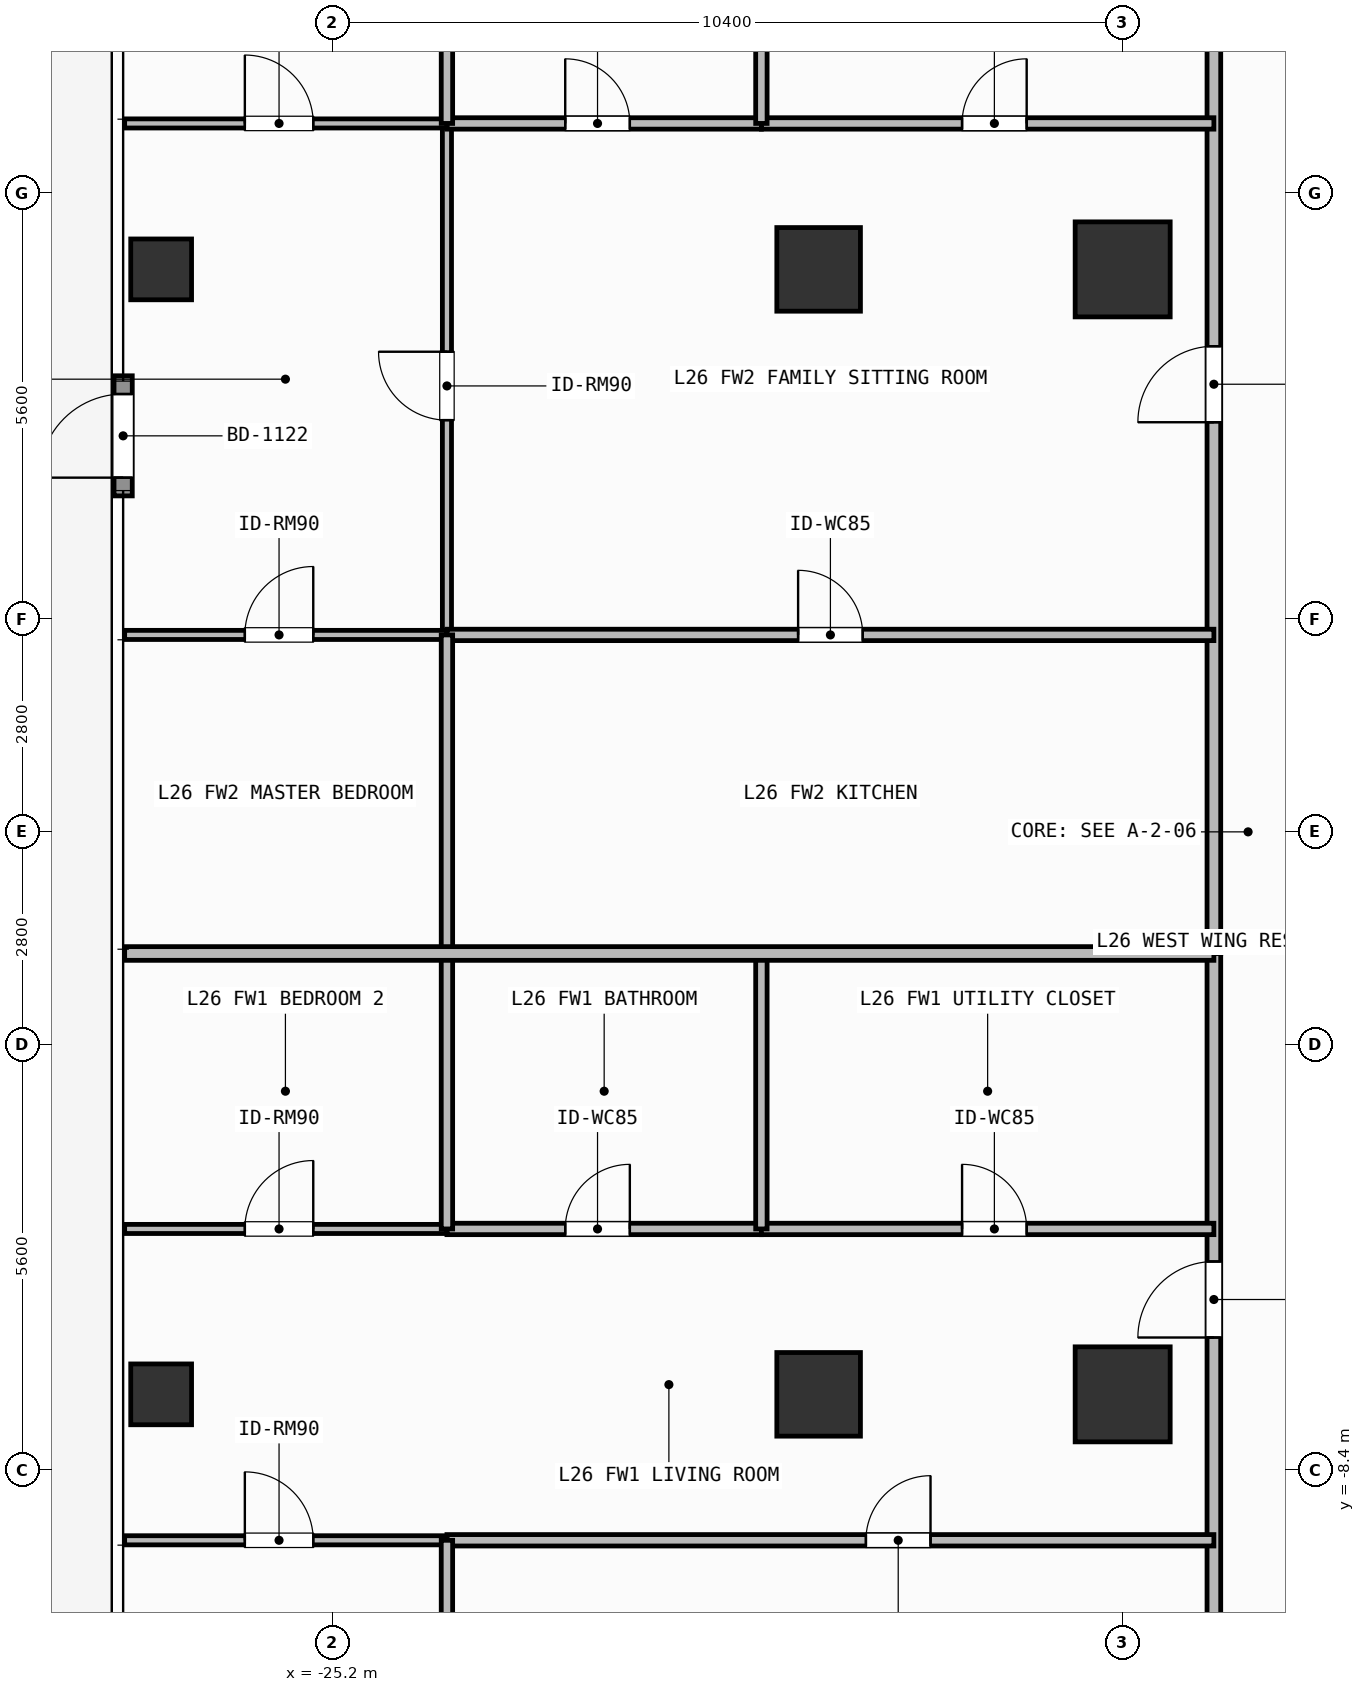
"""IFC4 building model, lengths in metres.
Left out: names, types, materials, properties, quantities, classifications, styles, units other than length and angle.
Written with IfcOpenShell. Run it as: python <this file> out.ifc"""

import sys

from ifc_helpers import new_model, si_unit, direction, frame, frame_2d, origin, origin_2d, place, context, subcontext, project, spatial, rectangle, hollow_rectangle, extrude, element, fill, save


model = new_model("IFC4")
c1 = context("Model", 3, precision=1e-05, world=origin(), true_north=direction((0.0, 1.0)))
c2 = subcontext(c1, "Body", "Model", "MODEL_VIEW")
j1 = project(units=[si_unit("LENGTHUNIT", "METRE"), si_unit("PLANEANGLEUNIT", "RADIAN")], contexts=[c1])
p1 = place(None, origin())
s1 = spatial("IfcSite", under=j1, at=p1, CompositionType="ELEMENT")
p2 = place(p1, origin())
s2 = spatial("IfcBuilding", under=s1, at=p2, CompositionType="ELEMENT")
p3 = place(p2, frame((0.0, 0.0, 104.7)))
s3 = spatial("IfcBuildingStorey", under=s2, at=p3, CompositionType="ELEMENT", Elevation=104.7)
for number, where, z_axis, x_axis in (
    (1, (-14.8, -7.4, 0.0), (0.0, 0.0, 1.0), (1.0, 0.0, 0.0)),
    (2, (-14.8, 7.4, 0.0), (0.0, 0.0, 1.0), (1.0, 0.0, 0.0)),
):
    element("IfcColumn", number, at=place(p3, frame(where, z_axis=z_axis, x_axis=x_axis)), inside=s3, PredefinedType="COLUMN", context=c2, shape_type="SweptSolid", body=[
        extrude(rectangle(XDim=1.25, YDim=1.25, at=origin_2d()), origin(), (0.0, 0.0, 1.0), 3.9),
    ])
for number, where, z_axis, x_axis in (
    (3, (-18.8, -7.4, 0.0), (0.0, 0.0, 1.0), (1.0, 0.0, 0.0)),
    (4, (-18.8, 7.4, 0.0), (0.0, 0.0, 1.0), (1.0, 0.0, 0.0)),
):
    element("IfcColumn", number, at=place(p3, frame(where, z_axis=z_axis, x_axis=x_axis)), inside=s3, PredefinedType="COLUMN", context=c2, shape_type="SweptSolid", body=[
        extrude(rectangle(XDim=1.1, YDim=1.1, at=origin_2d()), origin(), (0.0, 0.0, 1.0), 3.9),
    ])
for number, where, z_axis, x_axis in (
    (5, (-27.45, -7.4, 0.0), (0.0, 0.0, 1.0), (1.0, 0.0, 0.0)),
    (6, (-27.45, 7.4, 0.0), (0.0, 0.0, 1.0), (1.0, 0.0, 0.0)),
):
    element("IfcColumn", number, at=place(p3, frame(where, z_axis=z_axis, x_axis=x_axis)), inside=s3, PredefinedType="COLUMN", context=c2, shape_type="SweptSolid", body=[
        extrude(hollow_rectangle(XDim=0.8, YDim=0.8, WallThickness=0.036, at=origin_2d()), origin(), (0.0, 0.0, 1.0), 3.9),
    ])
p4 = place(p3, frame((-27.95, 4.42, 0.0), z_axis=(0.0, 0.0, 1.0), x_axis=(0.0, 1.0, 0.0)))
e7 = element("IfcWall", 7, at=p4, inside=s3, PredefinedType="SOLIDWALL", context=c2, shape_type="SweptSolid", body=[
    extrude(rectangle(XDim=1.58, YDim=0.24, at=frame_2d((0.79, 0.0))), origin(), (0.0, 0.0, 1.0), 3.62),
])
p5 = place(p4, frame((0.24, 0.0, 0.0)))
e8 = element("IfcOpeningElement", 8, at=p5, cuts=e7, PredefinedType="OPENING", context=c2, shape_type="SweptSolid", body=[
    extrude(rectangle(XDim=1.1, YDim=2.2, at=frame_2d((0.55, 1.1))), frame((0.0, 0.13, 0.0), z_axis=(0.0, -1.0, 0.0), x_axis=(1.0, 0.0, 0.0)), (0.0, 0.0, 1.0), 0.26),
])
p6 = place(p3, frame((-13.6, -12.12, 0.0), z_axis=(0.0, 0.0, 1.0), x_axis=(0.0, 1.0, 0.0)))
e9 = element("IfcWall", 9, at=p6, inside=s3, PredefinedType="PARTITIONING", context=c2, shape_type="SweptSolid", body=[
    extrude(rectangle(XDim=10.52, YDim=0.18, at=frame_2d((5.26, 0.0))), origin(), (0.0, 0.0, 1.0), 3.62),
])
p7 = place(p6, frame((5.468, 0.0, 0.0)))
e10 = element("IfcOpeningElement", 10, at=p7, cuts=e9, PredefinedType="OPENING", context=c2, shape_type="SweptSolid", body=[
    extrude(rectangle(XDim=1.0, YDim=2.2, at=frame_2d((0.5, 1.1))), frame((0.0, 0.1, 0.0), z_axis=(0.0, -1.0, 0.0), x_axis=(1.0, 0.0, 0.0)), (0.0, 0.0, 1.0), 0.2),
])
p8 = place(p3, frame((-23.69, -5.224, 0.0), z_axis=(0.0, 0.0, 1.0), x_axis=(1.0, 0.0, 0.0)))
e11 = element("IfcWall", 11, at=p8, inside=s3, PredefinedType="PARTITIONING", context=c2, shape_type="SweptSolid", body=[
    extrude(rectangle(XDim=4.137, YDim=0.15, at=frame_2d((2.068, 0.0))), origin(), (0.0, 0.0, 1.0), 3.62),
])
p9 = place(p8, frame((1.556, 0.0, 0.0)))
e12 = element("IfcOpeningElement", 12, at=p9, cuts=e11, PredefinedType="OPENING", context=c2, shape_type="SweptSolid", body=[
    extrude(rectangle(XDim=0.85, YDim=2.1, at=frame_2d((0.425, 1.05))), frame((0.0, 0.085, 0.0), z_axis=(0.0, -1.0, 0.0), x_axis=(1.0, 0.0, 0.0)), (0.0, 0.0, 1.0), 0.17),
])
p10 = place(p3, frame((-19.553, -5.224, 0.0), z_axis=(0.0, 0.0, 1.0), x_axis=(1.0, 0.0, 0.0)))
e13 = element("IfcWall", 13, at=p10, inside=s3, PredefinedType="PARTITIONING", context=c2, shape_type="SweptSolid", body=[
    extrude(rectangle(XDim=5.953, YDim=0.15, at=frame_2d((2.977, 0.0))), origin(), (0.0, 0.0, 1.0), 3.62),
])
p11 = place(p10, frame((2.64, 0.0, 0.0)))
e14 = element("IfcOpeningElement", 14, at=p11, cuts=e13, PredefinedType="OPENING", context=c2, shape_type="SweptSolid", body=[
    extrude(rectangle(XDim=0.85, YDim=2.1, at=frame_2d((0.425, 1.05))), frame((0.0, 0.085, 0.0), z_axis=(0.0, -1.0, 0.0), x_axis=(1.0, 0.0, 0.0)), (0.0, 0.0, 1.0), 0.17),
])
p12 = place(p3, frame((-23.69, -9.32, 0.0), z_axis=(0.0, 0.0, 1.0), x_axis=(1.0, 0.0, 0.0)))
e15 = element("IfcWall", 15, at=p12, inside=s3, PredefinedType="PARTITIONING", context=c2, shape_type="SweptSolid", body=[
    extrude(rectangle(XDim=10.09, YDim=0.15, at=frame_2d((5.045, 0.0))), origin(), (0.0, 0.0, 1.0), 3.62),
])
p13 = place(p12, frame((5.512, 0.0, 0.0)))
e16 = element("IfcOpeningElement", 16, at=p13, cuts=e15, PredefinedType="OPENING", context=c2, shape_type="SweptSolid", body=[
    extrude(rectangle(XDim=0.85, YDim=2.1, at=frame_2d((0.425, 1.05))), frame((0.0, 0.085, 0.0), z_axis=(0.0, -1.0, 0.0), x_axis=(1.0, 0.0, 0.0)), (0.0, 0.0, 1.0), 0.17),
])
p14 = place(p3, frame((-27.93, -9.32, 0.0), z_axis=(0.0, 0.0, 1.0), x_axis=(1.0, 0.0, 0.0)))
e17 = element("IfcWall", 17, at=p14, inside=s3, PredefinedType="PARTITIONING", context=c2, shape_type="SweptSolid", body=[
    extrude(rectangle(XDim=4.24, YDim=0.12, at=frame_2d((2.12, 0.0))), origin(), (0.0, 0.0, 1.0), 3.62),
])
p15 = place(p14, frame((1.581, 0.0, 0.0)))
e18 = element("IfcOpeningElement", 18, at=p15, cuts=e17, PredefinedType="OPENING", context=c2, shape_type="SweptSolid", body=[
    extrude(rectangle(XDim=0.9, YDim=2.1, at=frame_2d((0.45, 1.05))), frame((0.0, 0.07, 0.0), z_axis=(0.0, -1.0, 0.0), x_axis=(1.0, 0.0, 0.0)), (0.0, 0.0, 1.0), 0.14),
])
p16 = place(p3, frame((-27.93, -5.224, 0.0), z_axis=(0.0, 0.0, 1.0), x_axis=(1.0, 0.0, 0.0)))
e19 = element("IfcWall", 19, at=p16, inside=s3, PredefinedType="PARTITIONING", context=c2, shape_type="SweptSolid", body=[
    extrude(rectangle(XDim=4.24, YDim=0.12, at=frame_2d((2.12, 0.0))), origin(), (0.0, 0.0, 1.0), 3.62),
])
p17 = place(p16, frame((1.581, 0.0, 0.0)))
e20 = element("IfcOpeningElement", 20, at=p17, cuts=e19, PredefinedType="OPENING", context=c2, shape_type="SweptSolid", body=[
    extrude(rectangle(XDim=0.9, YDim=2.1, at=frame_2d((0.45, 1.05))), frame((0.0, 0.07, 0.0), z_axis=(0.0, -1.0, 0.0), x_axis=(1.0, 0.0, 0.0)), (0.0, 0.0, 1.0), 0.14),
])
p18 = place(p3, frame((-13.6, -1.6, 0.0), z_axis=(0.0, 0.0, 1.0), x_axis=(0.0, 1.0, 0.0)))
e21 = element("IfcWall", 21, at=p18, inside=s3, PredefinedType="PARTITIONING", context=c2, shape_type="SweptSolid", body=[
    extrude(rectangle(XDim=13.72, YDim=0.18, at=frame_2d((6.86, 0.0))), origin(), (0.0, 0.0, 1.0), 3.62),
])
p19 = place(p18, frame((6.989, 0.0, 0.0)))
e22 = element("IfcOpeningElement", 22, at=p19, cuts=e21, PredefinedType="OPENING", context=c2, shape_type="SweptSolid", body=[
    extrude(rectangle(XDim=1.0, YDim=2.2, at=frame_2d((0.5, 1.1))), frame((0.0, 0.1, 0.0), z_axis=(0.0, -1.0, 0.0), x_axis=(1.0, 0.0, 0.0)), (0.0, 0.0, 1.0), 0.2),
])
p20 = place(p3, frame((-23.69, 2.591, 0.0), z_axis=(0.0, 0.0, 1.0), x_axis=(0.0, 1.0, 0.0)))
e23 = element("IfcWall", 23, at=p20, inside=s3, PredefinedType="PARTITIONING", context=c2, shape_type="SweptSolid", body=[
    extrude(rectangle(XDim=6.729, YDim=0.12, at=frame_2d((3.365, 0.0))), origin(), (0.0, 0.0, 1.0), 3.62),
])
p21 = place(p20, frame((2.826, 0.0, 0.0)))
e24 = element("IfcOpeningElement", 24, at=p21, cuts=e23, PredefinedType="OPENING", context=c2, shape_type="SweptSolid", body=[
    extrude(rectangle(XDim=0.9, YDim=2.1, at=frame_2d((0.45, 1.05))), frame((0.0, 0.07, 0.0), z_axis=(0.0, -1.0, 0.0), x_axis=(1.0, 0.0, 0.0)), (0.0, 0.0, 1.0), 0.14),
])
p22 = place(p3, frame((-23.69, 9.32, 0.0), z_axis=(0.0, 0.0, 1.0), x_axis=(1.0, 0.0, 0.0)))
e25 = element("IfcWall", 25, at=p22, inside=s3, PredefinedType="PARTITIONING", context=c2, shape_type="SweptSolid", body=[
    extrude(rectangle(XDim=4.137, YDim=0.15, at=frame_2d((2.068, 0.0))), origin(), (0.0, 0.0, 1.0), 3.62),
])
p23 = place(p22, frame((1.556, 0.0, 0.0)))
e26 = element("IfcOpeningElement", 26, at=p23, cuts=e25, PredefinedType="OPENING", context=c2, shape_type="SweptSolid", body=[
    extrude(rectangle(XDim=0.85, YDim=2.1, at=frame_2d((0.425, 1.05))), frame((0.0, 0.085, 0.0), z_axis=(0.0, -1.0, 0.0), x_axis=(1.0, 0.0, 0.0)), (0.0, 0.0, 1.0), 0.17),
])
p24 = place(p3, frame((-19.553, 9.32, 0.0), z_axis=(0.0, 0.0, 1.0), x_axis=(1.0, 0.0, 0.0)))
e27 = element("IfcWall", 27, at=p24, inside=s3, PredefinedType="PARTITIONING", context=c2, shape_type="SweptSolid", body=[
    extrude(rectangle(XDim=5.953, YDim=0.15, at=frame_2d((2.977, 0.0))), origin(), (0.0, 0.0, 1.0), 3.62),
])
p25 = place(p24, frame((2.64, 0.0, 0.0)))
e28 = element("IfcOpeningElement", 28, at=p25, cuts=e27, PredefinedType="OPENING", context=c2, shape_type="SweptSolid", body=[
    extrude(rectangle(XDim=0.85, YDim=2.1, at=frame_2d((0.425, 1.05))), frame((0.0, 0.085, 0.0), z_axis=(0.0, -1.0, 0.0), x_axis=(1.0, 0.0, 0.0)), (0.0, 0.0, 1.0), 0.17),
])
p26 = place(p3, frame((-23.69, 2.591, 0.0), z_axis=(0.0, 0.0, 1.0), x_axis=(1.0, 0.0, 0.0)))
e29 = element("IfcWall", 29, at=p26, inside=s3, PredefinedType="PARTITIONING", context=c2, shape_type="SweptSolid", body=[
    extrude(rectangle(XDim=10.09, YDim=0.15, at=frame_2d((5.045, 0.0))), origin(), (0.0, 0.0, 1.0), 3.62),
])
p27 = place(p26, frame((4.62, 0.0, 0.0)))
e30 = element("IfcOpeningElement", 30, at=p27, cuts=e29, PredefinedType="OPENING", context=c2, shape_type="SweptSolid", body=[
    extrude(rectangle(XDim=0.85, YDim=2.1, at=frame_2d((0.425, 1.05))), frame((0.0, 0.085, 0.0), z_axis=(0.0, -1.0, 0.0), x_axis=(1.0, 0.0, 0.0)), (0.0, 0.0, 1.0), 0.17),
])
p28 = place(p3, frame((-27.93, 2.591, 0.0), z_axis=(0.0, 0.0, 1.0), x_axis=(1.0, 0.0, 0.0)))
e31 = element("IfcWall", 31, at=p28, inside=s3, PredefinedType="PARTITIONING", context=c2, shape_type="SweptSolid", body=[
    extrude(rectangle(XDim=4.24, YDim=0.12, at=frame_2d((2.12, 0.0))), origin(), (0.0, 0.0, 1.0), 3.62),
])
p29 = place(p28, frame((1.581, 0.0, 0.0)))
e32 = element("IfcOpeningElement", 32, at=p29, cuts=e31, PredefinedType="OPENING", context=c2, shape_type="SweptSolid", body=[
    extrude(rectangle(XDim=0.9, YDim=2.1, at=frame_2d((0.45, 1.05))), frame((0.0, 0.07, 0.0), z_axis=(0.0, -1.0, 0.0), x_axis=(1.0, 0.0, 0.0)), (0.0, 0.0, 1.0), 0.14),
])
p30 = place(p3, frame((-27.93, 9.32, 0.0), z_axis=(0.0, 0.0, 1.0), x_axis=(1.0, 0.0, 0.0)))
e33 = element("IfcWall", 33, at=p30, inside=s3, PredefinedType="PARTITIONING", context=c2, shape_type="SweptSolid", body=[
    extrude(rectangle(XDim=4.24, YDim=0.12, at=frame_2d((2.12, 0.0))), origin(), (0.0, 0.0, 1.0), 3.62),
])
p31 = place(p30, frame((1.581, 0.0, 0.0)))
e34 = element("IfcOpeningElement", 34, at=p31, cuts=e33, PredefinedType="OPENING", context=c2, shape_type="SweptSolid", body=[
    extrude(rectangle(XDim=0.9, YDim=2.1, at=frame_2d((0.45, 1.05))), frame((0.0, 0.07, 0.0), z_axis=(0.0, -1.0, 0.0), x_axis=(1.0, 0.0, 0.0)), (0.0, 0.0, 1.0), 0.14),
])
p32 = place(p3, frame((-19.553, -5.224, 0.0), z_axis=(0.0, 0.0, 1.0), x_axis=(0.0, 1.0, 0.0)))
e35 = element("IfcWall", 35, at=p32, inside=s3, PredefinedType="PARTITIONING", context=c2, shape_type="SweptSolid", body=[
    extrude(rectangle(XDim=3.624, YDim=0.15, at=frame_2d((1.812, 0.0))), origin(), (0.0, 0.0, 1.0), 3.62),
])
p33 = place(p3, frame((-23.69, -12.12, 0.0), z_axis=(0.0, 0.0, 1.0), x_axis=(0.0, 1.0, 0.0)))
e36 = element("IfcWall", 36, at=p33, inside=s3, PredefinedType="PARTITIONING", context=c2, shape_type="SweptSolid", body=[
    extrude(rectangle(XDim=2.8, YDim=0.15, at=frame_2d((1.4, 0.0))), origin(), (0.0, 0.0, 1.0), 3.62),
])
p34 = place(p3, frame((-23.69, -5.224, 0.0), z_axis=(0.0, 0.0, 1.0), x_axis=(0.0, 1.0, 0.0)))
e37 = element("IfcWall", 37, at=p34, inside=s3, PredefinedType="PARTITIONING", context=c2, shape_type="SweptSolid", body=[
    extrude(rectangle(XDim=3.624, YDim=0.15, at=frame_2d((1.812, 0.0))), origin(), (0.0, 0.0, 1.0), 3.62),
])
p35 = place(p3, frame((-19.553, 9.32, 0.0), z_axis=(0.0, 0.0, 1.0), x_axis=(0.0, 1.0, 0.0)))
e38 = element("IfcWall", 38, at=p35, inside=s3, PredefinedType="PARTITIONING", context=c2, shape_type="SweptSolid", body=[
    extrude(rectangle(XDim=2.8, YDim=0.15, at=frame_2d((1.4, 0.0))), origin(), (0.0, 0.0, 1.0), 3.62),
])
p36 = place(p3, frame((-23.69, -1.6, 0.0), z_axis=(0.0, 0.0, 1.0), x_axis=(0.0, 1.0, 0.0)))
e39 = element("IfcWall", 39, at=p36, inside=s3, PredefinedType="PARTITIONING", context=c2, shape_type="SweptSolid", body=[
    extrude(rectangle(XDim=4.191, YDim=0.15, at=frame_2d((2.096, 0.0))), origin(), (0.0, 0.0, 1.0), 3.62),
])
p37 = place(p3, frame((-23.69, 9.32, 0.0), z_axis=(0.0, 0.0, 1.0), x_axis=(0.0, 1.0, 0.0)))
e40 = element("IfcWall", 40, at=p37, inside=s3, PredefinedType="PARTITIONING", context=c2, shape_type="SweptSolid", body=[
    extrude(rectangle(XDim=2.8, YDim=0.15, at=frame_2d((1.4, 0.0))), origin(), (0.0, 0.0, 1.0), 3.62),
])
p38 = place(p3, frame((-27.93, -1.6, 0.0), z_axis=(0.0, 0.0, 1.0), x_axis=(1.0, 0.0, 0.0)))
e41 = element("IfcWall", 41, at=p38, inside=s3, PredefinedType="PARTITIONING", context=c2, shape_type="SweptSolid", body=[
    extrude(rectangle(XDim=14.33, YDim=0.18, at=frame_2d((7.165, 0.0))), origin(), (0.0, 0.0, 1.0), 3.62),
])
p39 = place(p5, origin())
e42 = element("IfcDoor", 42, at=p39, inside=s3, OperationType="SINGLE_SWING_LEFT", PredefinedType="DOOR", context=c2, shape_type="SweptSolid", body=[
    extrude(rectangle(XDim=1.1, YDim=2.2, at=frame_2d((0.55, 1.1))), frame((0.0, 0.025, 0.0), z_axis=(0.0, -1.0, 0.0), x_axis=(1.0, 0.0, 0.0)), (0.0, 0.0, 1.0), 0.05),
])
fill(e8, e42)
p40 = place(p7, origin())
e43 = element("IfcDoor", 43, at=p40, inside=s3, OperationType="SINGLE_SWING_LEFT", PredefinedType="DOOR", context=c2, shape_type="SweptSolid", body=[
    extrude(rectangle(XDim=1.0, YDim=2.2, at=frame_2d((0.5, 1.1))), frame((0.0, 0.025, 0.0), z_axis=(0.0, -1.0, 0.0), x_axis=(1.0, 0.0, 0.0)), (0.0, 0.0, 1.0), 0.05),
])
fill(e10, e43)
p41 = place(p9, origin())
e44 = element("IfcDoor", 44, at=p41, inside=s3, OperationType="SINGLE_SWING_RIGHT", PredefinedType="DOOR", context=c2, shape_type="SweptSolid", body=[
    extrude(rectangle(XDim=0.85, YDim=2.1, at=frame_2d((0.425, 1.05))), frame((0.0, 0.025, 0.0), z_axis=(0.0, -1.0, 0.0), x_axis=(1.0, 0.0, 0.0)), (0.0, 0.0, 1.0), 0.05),
])
fill(e12, e44)
p42 = place(p11, origin())
e45 = element("IfcDoor", 45, at=p42, inside=s3, OperationType="SINGLE_SWING_LEFT", PredefinedType="DOOR", context=c2, shape_type="SweptSolid", body=[
    extrude(rectangle(XDim=0.85, YDim=2.1, at=frame_2d((0.425, 1.05))), frame((0.0, 0.025, 0.0), z_axis=(0.0, -1.0, 0.0), x_axis=(1.0, 0.0, 0.0)), (0.0, 0.0, 1.0), 0.05),
])
fill(e14, e45)
p43 = place(p13, origin())
e46 = element("IfcDoor", 46, at=p43, inside=s3, OperationType="SINGLE_SWING_RIGHT", PredefinedType="DOOR", context=c2, shape_type="SweptSolid", body=[
    extrude(rectangle(XDim=0.85, YDim=2.1, at=frame_2d((0.425, 1.05))), frame((0.0, 0.025, 0.0), z_axis=(0.0, -1.0, 0.0), x_axis=(1.0, 0.0, 0.0)), (0.0, 0.0, 1.0), 0.05),
])
fill(e16, e46)
p44 = place(p15, origin())
e47 = element("IfcDoor", 47, at=p44, inside=s3, OperationType="SINGLE_SWING_LEFT", PredefinedType="DOOR", context=c2, shape_type="SweptSolid", body=[
    extrude(rectangle(XDim=0.9, YDim=2.1, at=frame_2d((0.45, 1.05))), frame((0.0, 0.025, 0.0), z_axis=(0.0, -1.0, 0.0), x_axis=(1.0, 0.0, 0.0)), (0.0, 0.0, 1.0), 0.05),
])
fill(e18, e47)
p45 = place(p17, origin())
e48 = element("IfcDoor", 48, at=p45, inside=s3, OperationType="SINGLE_SWING_RIGHT", PredefinedType="DOOR", context=c2, shape_type="SweptSolid", body=[
    extrude(rectangle(XDim=0.9, YDim=2.1, at=frame_2d((0.45, 1.05))), frame((0.0, 0.025, 0.0), z_axis=(0.0, -1.0, 0.0), x_axis=(1.0, 0.0, 0.0)), (0.0, 0.0, 1.0), 0.05),
])
fill(e20, e48)
p46 = place(p19, origin())
e49 = element("IfcDoor", 49, at=p46, inside=s3, OperationType="SINGLE_SWING_LEFT", PredefinedType="DOOR", context=c2, shape_type="SweptSolid", body=[
    extrude(rectangle(XDim=1.0, YDim=2.2, at=frame_2d((0.5, 1.1))), frame((0.0, 0.025, 0.0), z_axis=(0.0, -1.0, 0.0), x_axis=(1.0, 0.0, 0.0)), (0.0, 0.0, 1.0), 0.05),
])
fill(e22, e49)
p47 = place(p21, origin())
e50 = element("IfcDoor", 50, at=p47, inside=s3, OperationType="SINGLE_SWING_RIGHT", PredefinedType="DOOR", context=c2, shape_type="SweptSolid", body=[
    extrude(rectangle(XDim=0.9, YDim=2.1, at=frame_2d((0.45, 1.05))), frame((0.0, 0.025, 0.0), z_axis=(0.0, -1.0, 0.0), x_axis=(1.0, 0.0, 0.0)), (0.0, 0.0, 1.0), 0.05),
])
fill(e24, e50)
p48 = place(p23, origin())
e51 = element("IfcDoor", 51, at=p48, inside=s3, OperationType="SINGLE_SWING_LEFT", PredefinedType="DOOR", context=c2, shape_type="SweptSolid", body=[
    extrude(rectangle(XDim=0.85, YDim=2.1, at=frame_2d((0.425, 1.05))), frame((0.0, 0.025, 0.0), z_axis=(0.0, -1.0, 0.0), x_axis=(1.0, 0.0, 0.0)), (0.0, 0.0, 1.0), 0.05),
])
fill(e26, e51)
p49 = place(p25, origin())
e52 = element("IfcDoor", 52, at=p49, inside=s3, OperationType="SINGLE_SWING_RIGHT", PredefinedType="DOOR", context=c2, shape_type="SweptSolid", body=[
    extrude(rectangle(XDim=0.85, YDim=2.1, at=frame_2d((0.425, 1.05))), frame((0.0, 0.025, 0.0), z_axis=(0.0, -1.0, 0.0), x_axis=(1.0, 0.0, 0.0)), (0.0, 0.0, 1.0), 0.05),
])
fill(e28, e52)
p50 = place(p27, origin())
e53 = element("IfcDoor", 53, at=p50, inside=s3, OperationType="SINGLE_SWING_LEFT", PredefinedType="DOOR", context=c2, shape_type="SweptSolid", body=[
    extrude(rectangle(XDim=0.85, YDim=2.1, at=frame_2d((0.425, 1.05))), frame((0.0, 0.025, 0.0), z_axis=(0.0, -1.0, 0.0), x_axis=(1.0, 0.0, 0.0)), (0.0, 0.0, 1.0), 0.05),
])
fill(e30, e53)
p51 = place(p29, origin())
e54 = element("IfcDoor", 54, at=p51, inside=s3, OperationType="SINGLE_SWING_RIGHT", PredefinedType="DOOR", context=c2, shape_type="SweptSolid", body=[
    extrude(rectangle(XDim=0.9, YDim=2.1, at=frame_2d((0.45, 1.05))), frame((0.0, 0.025, 0.0), z_axis=(0.0, -1.0, 0.0), x_axis=(1.0, 0.0, 0.0)), (0.0, 0.0, 1.0), 0.05),
])
fill(e32, e54)
p52 = place(p31, origin())
e55 = element("IfcDoor", 55, at=p52, inside=s3, OperationType="SINGLE_SWING_LEFT", PredefinedType="DOOR", context=c2, shape_type="SweptSolid", body=[
    extrude(rectangle(XDim=0.9, YDim=2.1, at=frame_2d((0.45, 1.05))), frame((0.0, 0.025, 0.0), z_axis=(0.0, -1.0, 0.0), x_axis=(1.0, 0.0, 0.0)), (0.0, 0.0, 1.0), 0.05),
])
fill(e34, e55)
save(model, sys.argv[1])
